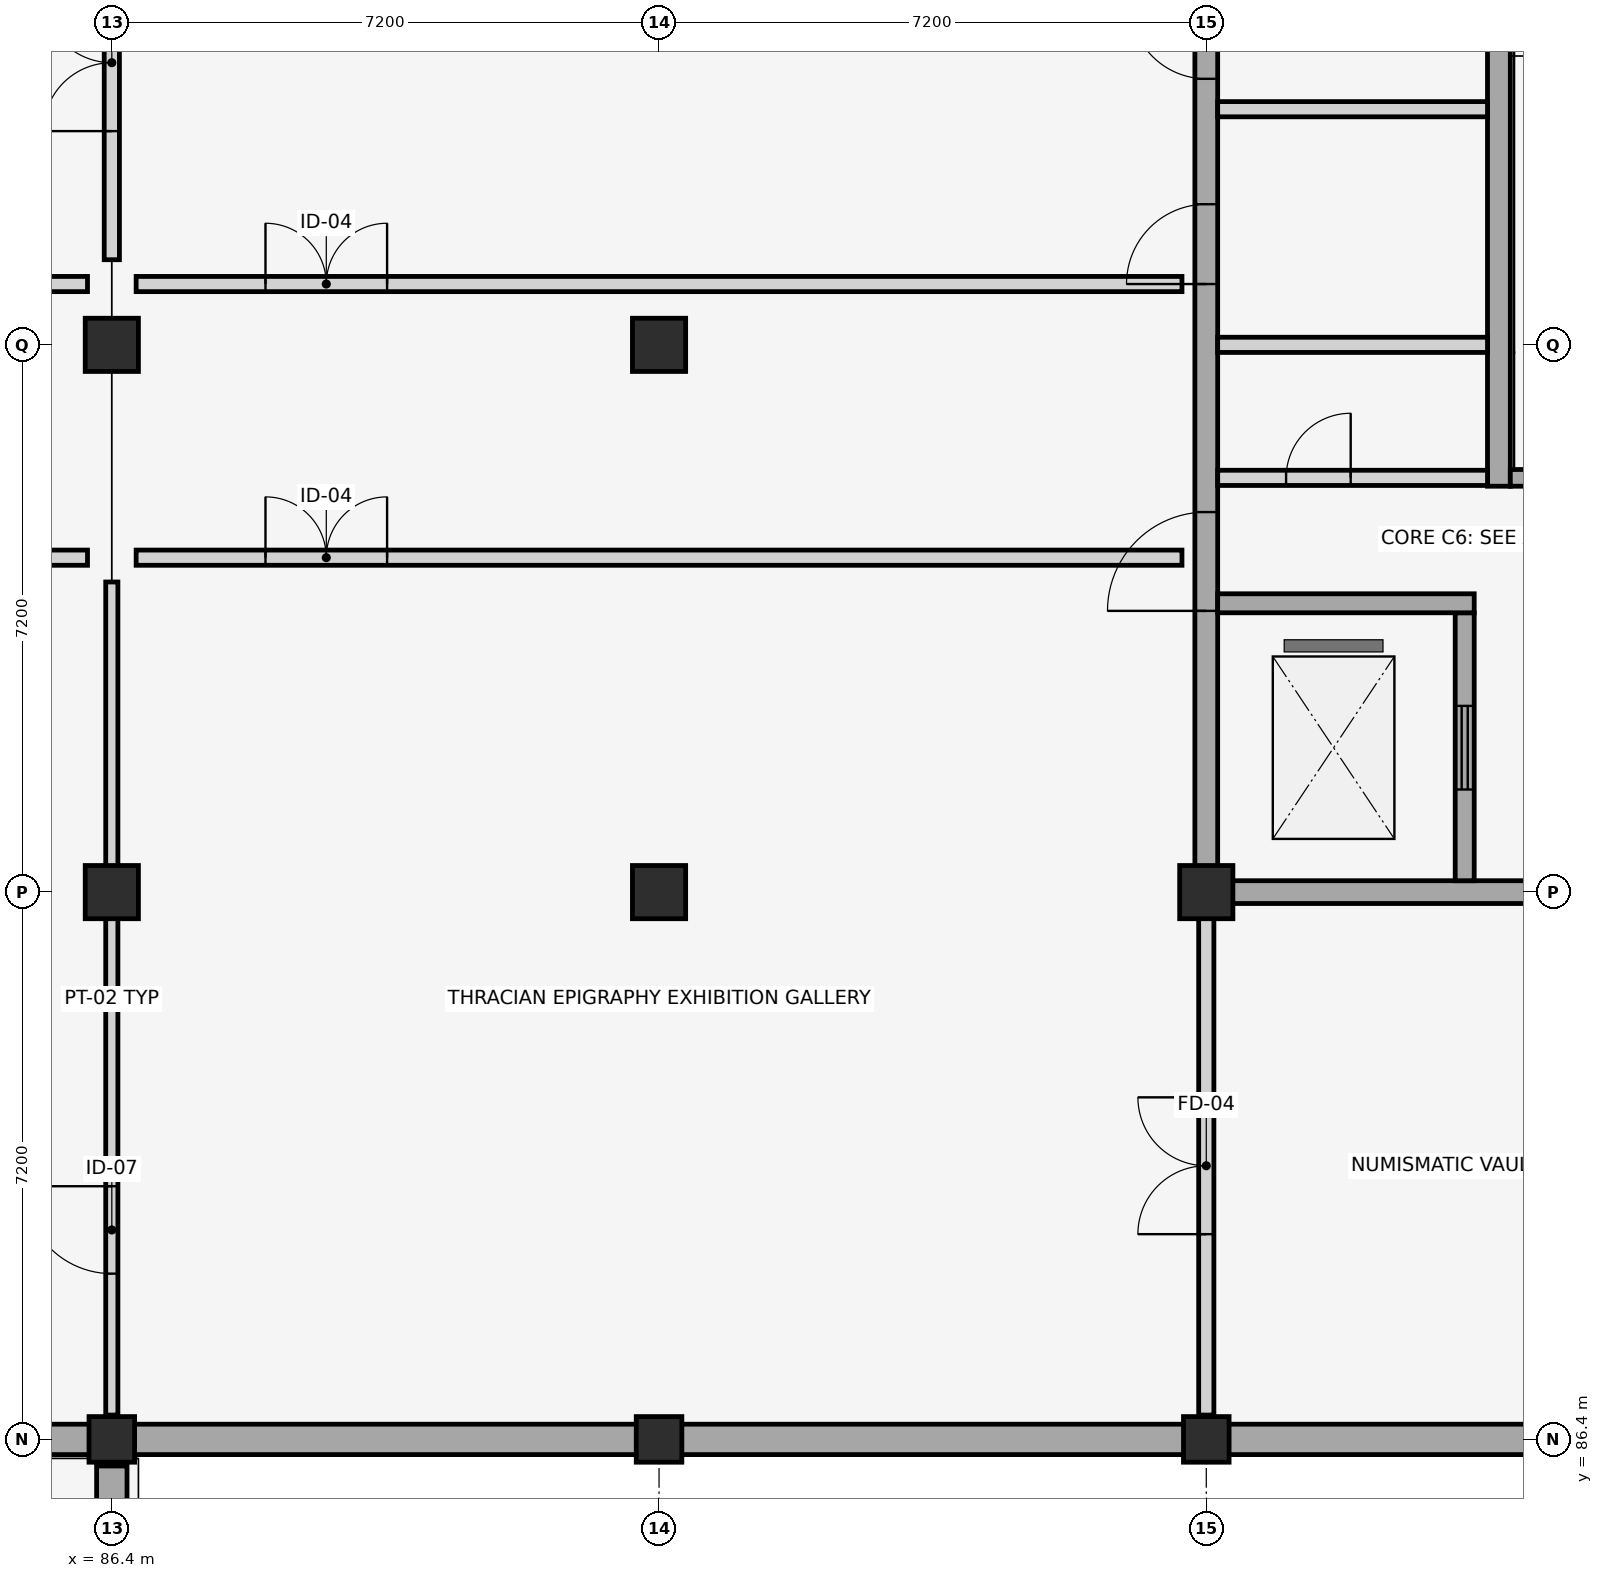
"""IFC4 building model, lengths in metres.
Left out: names, types, materials, properties, quantities, classifications, styles, units other than length and angle.
Written with IfcOpenShell. Run it as: python <this file> out.ifc"""

import sys

from ifc_helpers import new_model, si_unit, direction, frame, frame_2d, origin, origin_2d, place, context, subcontext, project, spatial, rectangle, extrude, element, fill, save


model = new_model("IFC4")
c1 = context("Model", 3, precision=1e-05, world=origin(), true_north=direction((0.0, 1.0)))
c2 = subcontext(c1, "Body", "Model", "MODEL_VIEW")
j1 = project(units=[si_unit("LENGTHUNIT", "METRE"), si_unit("PLANEANGLEUNIT", "RADIAN")], contexts=[c1])
p1 = place(None, origin())
s1 = spatial("IfcSite", under=j1, at=p1, CompositionType="ELEMENT")
p2 = place(p1, origin())
s2 = spatial("IfcBuilding", under=s1, at=p2, CompositionType="ELEMENT")
p3 = place(p2, frame((0.0, 0.0, -4.5)))
s3 = spatial("IfcBuildingStorey", under=s2, at=p3, CompositionType="ELEMENT", Elevation=-4.5)
p4 = place(p3, frame((57.4, 86.4, 0.0), z_axis=(0.0, 0.0, 1.0), x_axis=(1.0, 0.0, 0.0)))
e1 = element("IfcWall", 1, at=p4, inside=s3, PredefinedType="USERDEFINED", context=c2, shape_type="SweptSolid", body=[
    extrude(rectangle(XDim=50.8, YDim=0.4, at=frame_2d((25.4, 0.0))), origin(), (0.0, 0.0, 1.0), 3.67),
])
p5 = place(p4, frame((24.3, 0.0, 0.0)))
e2 = element("IfcOpeningElement", 2, at=p5, cuts=e1, PredefinedType="OPENING", context=c2, shape_type="SweptSolid", body=[
    extrude(rectangle(XDim=1.8, YDim=2.4, at=frame_2d((0.9, 1.2))), frame((0.0, 0.21, 0.0), z_axis=(0.0, -1.0, 0.0), x_axis=(1.0, 0.0, 0.0)), (0.0, 0.0, 1.0), 0.42),
])
p6 = place(p3, frame((86.4, 86.4, -0.45), z_axis=(0.0, 0.0, 1.0), x_axis=(1.0, 0.0, 0.0)))
e3 = element("IfcColumn", 3, at=p6, inside=s3, PredefinedType="COLUMN", context=c2, shape_type="SweptSolid", body=[
    extrude(rectangle(XDim=0.6, YDim=0.6, at=origin_2d()), origin(), (0.0, 0.0, 1.0), 4.95),
])
for number, where, z_axis, x_axis in (
    (4, (86.4, 93.6, -0.45), (0.0, 0.0, 1.0), (0.0, 1.0, 0.0)),
    (5, (86.4, 100.8, -0.45), (0.0, 0.0, 1.0), (1.0, 0.0, 0.0)),
):
    element("IfcColumn", number, at=place(p3, frame(where, z_axis=z_axis, x_axis=x_axis)), inside=s3, PredefinedType="COLUMN", context=c2, shape_type="SweptSolid", body=[
        extrude(rectangle(XDim=0.7, YDim=0.7, at=origin_2d()), origin(), (0.0, 0.0, 1.0), 4.95),
    ])
p7 = place(p3, frame((93.6, 86.4, -0.45), z_axis=(0.0, 0.0, 1.0), x_axis=(0.0, 1.0, 0.0)))
e6 = element("IfcColumn", 6, at=p7, inside=s3, PredefinedType="COLUMN", context=c2, shape_type="SweptSolid", body=[
    extrude(rectangle(XDim=0.6, YDim=0.6, at=origin_2d()), origin(), (0.0, 0.0, 1.0), 4.95),
])
for number, where, z_axis, x_axis in (
    (7, (93.6, 93.6, -0.45), (0.0, 0.0, 1.0), (1.0, 0.0, 0.0)),
    (8, (93.6, 100.8, -0.45), (0.0, 0.0, 1.0), (0.0, 1.0, 0.0)),
):
    element("IfcColumn", number, at=place(p3, frame(where, z_axis=z_axis, x_axis=x_axis)), inside=s3, PredefinedType="COLUMN", context=c2, shape_type="SweptSolid", body=[
        extrude(rectangle(XDim=0.7, YDim=0.7, at=origin_2d()), origin(), (0.0, 0.0, 1.0), 4.95),
    ])
p8 = place(p3, frame((100.8, 86.4, -0.45), z_axis=(0.0, 0.0, 1.0), x_axis=(1.0, 0.0, 0.0)))
e9 = element("IfcColumn", 9, at=p8, inside=s3, PredefinedType="COLUMN", context=c2, shape_type="SweptSolid", body=[
    extrude(rectangle(XDim=0.6, YDim=0.6, at=origin_2d()), origin(), (0.0, 0.0, 1.0), 4.95),
])
p9 = place(p3, frame((100.8, 93.6, -0.45), z_axis=(0.0, 0.0, 1.0), x_axis=(0.0, 1.0, 0.0)))
e10 = element("IfcColumn", 10, at=p9, inside=s3, PredefinedType="COLUMN", context=c2, shape_type="SweptSolid", body=[
    extrude(rectangle(XDim=0.7, YDim=0.7, at=origin_2d()), origin(), (0.0, 0.0, 1.0), 4.95),
])
p10 = place(p3, frame((86.4, 29.15, 0.0), z_axis=(0.0, 0.0, 1.0), x_axis=(0.0, 1.0, 0.0)))
e11 = element("IfcWall", 11, at=p10, inside=s3, PredefinedType="USERDEFINED", context=c2, shape_type="SweptSolid", body=[
    extrude(rectangle(XDim=56.9, YDim=0.4, at=frame_2d((28.45, 0.0))), origin(), (0.0, 0.0, 1.0), 3.67),
])
p11 = place(p3, frame((100.65, 93.6, 0.0), z_axis=(0.0, 0.0, 1.0), x_axis=(1.0, 0.0, 0.0)))
e12 = element("IfcWall", 12, at=p11, inside=s3, PredefinedType="SHEAR", context=c2, shape_type="SweptSolid", body=[
    extrude(rectangle(XDim=7.15, YDim=0.3, at=frame_2d((3.575, 0.0))), origin(), (0.0, 0.0, 1.0), 4.25),
])
p12 = place(p3, frame((100.8, 93.75, 0.0), z_axis=(0.0, 0.0, 1.0), x_axis=(0.0, 1.0, 0.0)))
e13 = element("IfcWall", 13, at=p12, inside=s3, PredefinedType="SHEAR", context=c2, shape_type="SweptSolid", body=[
    extrude(rectangle(XDim=14.1, YDim=0.3, at=frame_2d((7.05, 0.0))), origin(), (0.0, 0.0, 1.0), 4.25),
])
p13 = place(p12, frame((3.55, 0.0, 0.0)))
e14 = element("IfcOpeningElement", 14, at=p13, cuts=e13, PredefinedType="OPENING", context=c2, shape_type="SweptSolid", body=[
    extrude(rectangle(XDim=1.3, YDim=2.2, at=frame_2d((0.65, 1.1))), frame((0.0, 0.16, 0.0), z_axis=(0.0, -1.0, 0.0), x_axis=(1.0, 0.0, 0.0)), (0.0, 0.0, 1.0), 0.32),
])
p14 = place(p12, frame((7.85, 0.0, 0.0)))
e15 = element("IfcOpeningElement", 15, at=p14, cuts=e13, PredefinedType="OPENING", context=c2, shape_type="SweptSolid", body=[
    extrude(rectangle(XDim=1.05, YDim=2.15, at=frame_2d((0.525, 1.075))), frame((0.0, 0.16, 0.0), z_axis=(0.0, -1.0, 0.0), x_axis=(1.0, 0.0, 0.0)), (0.0, 0.0, 1.0), 0.32),
])
p15 = place(p12, frame((10.55, 0.0, 0.0)))
e16 = element("IfcOpeningElement", 16, at=p15, cuts=e13, PredefinedType="OPENING", context=c2, shape_type="SweptSolid", body=[
    extrude(rectangle(XDim=1.0, YDim=2.15, at=frame_2d((0.5, 1.075))), frame((0.0, 0.16, 0.0), z_axis=(0.0, -1.0, 0.0), x_axis=(1.0, 0.0, 0.0)), (0.0, 0.0, 1.0), 0.32),
])
p16 = place(p3, frame((104.2, 93.75, 0.0), z_axis=(0.0, 0.0, 1.0), x_axis=(0.0, 1.0, 0.0)))
e17 = element("IfcWall", 17, at=p16, inside=s3, PredefinedType="SHEAR", context=c2, shape_type="SweptSolid", body=[
    extrude(rectangle(XDim=3.525, YDim=0.25, at=frame_2d((1.762, 0.0))), origin(), (0.0, 0.0, 1.0), 4.25),
])
p17 = place(p16, frame((1.2, 0.0, 0.0)))
e18 = element("IfcOpeningElement", 18, at=p17, cuts=e17, PredefinedType="OPENING", context=c2, shape_type="SweptSolid", body=[
    extrude(rectangle(XDim=1.1, YDim=2.15, at=frame_2d((0.55, 1.075))), frame((0.0, 0.135, 0.0), z_axis=(0.0, -1.0, 0.0), x_axis=(1.0, 0.0, 0.0)), (0.0, 0.0, 1.0), 0.27),
])
p18 = place(p3, frame((104.65, 98.94, 0.0), z_axis=(0.0, 0.0, 1.0), x_axis=(0.0, 1.0, 0.0)))
e19 = element("IfcWall", 19, at=p18, inside=s3, PredefinedType="SHEAR", context=c2, shape_type="SweptSolid", body=[
    extrude(rectangle(XDim=8.91, YDim=0.3, at=frame_2d((4.455, 0.0))), origin(), (0.0, 0.0, 1.0), 4.25),
])
p19 = place(p3, frame((100.95, 99.05, 0.0), z_axis=(0.0, 0.0, 1.0), x_axis=(1.0, 0.0, 0.0)))
e20 = element("IfcWall", 20, at=p19, inside=s3, PredefinedType="PLUMBINGWALL", context=c2, shape_type="SweptSolid", body=[
    extrude(rectangle(XDim=3.55, YDim=0.2, at=frame_2d((1.775, 0.0))), origin(), (0.0, 0.0, 1.0), 3.67),
])
p20 = place(p19, frame((0.9, 0.0, 0.0)))
e21 = element("IfcOpeningElement", 21, at=p20, cuts=e20, PredefinedType="OPENING", context=c2, shape_type="SweptSolid", body=[
    extrude(rectangle(XDim=0.85, YDim=2.05, at=frame_2d((0.425, 1.025))), frame((0.0, 0.11, 0.0), z_axis=(0.0, -1.0, 0.0), x_axis=(1.0, 0.0, 0.0)), (0.0, 0.0, 1.0), 0.22),
])
p21 = place(p3, frame((104.8, 99.05, 0.0), z_axis=(0.0, 0.0, 1.0), x_axis=(1.0, 0.0, 0.0)))
e22 = element("IfcWall", 22, at=p21, inside=s3, PredefinedType="SHEAR", context=c2, shape_type="SweptSolid", body=[
    extrude(rectangle(XDim=3.0, YDim=0.22, at=frame_2d((1.5, 0.0))), origin(), (0.0, 0.0, 1.0), 4.25),
])
p22 = place(p21, frame((0.75, 0.0, 0.0)))
e23 = element("IfcOpeningElement", 23, at=p22, cuts=e22, PredefinedType="OPENING", context=c2, shape_type="SweptSolid", body=[
    extrude(rectangle(XDim=1.3, YDim=2.2, at=frame_2d((0.65, 1.1))), frame((0.0, 0.12, 0.0), z_axis=(0.0, -1.0, 0.0), x_axis=(1.0, 0.0, 0.0)), (0.0, 0.0, 1.0), 0.24),
])
p23 = place(p3, frame((100.95, 97.4, 0.0), z_axis=(0.0, 0.0, 1.0), x_axis=(1.0, 0.0, 0.0)))
e24 = element("IfcWall", 24, at=p23, inside=s3, PredefinedType="SHEAR", context=c2, shape_type="SweptSolid", body=[
    extrude(rectangle(XDim=3.375, YDim=0.25, at=frame_2d((1.688, 0.0))), origin(), (0.0, 0.0, 1.0), 4.25),
])
for number, where, z_axis, x_axis in (
    (25, (100.95, 100.8, 0.0), (0.0, 0.0, 1.0), (1.0, 0.0, 0.0)),
    (26, (100.95, 103.9, 0.0), (0.0, 0.0, 1.0), (1.0, 0.0, 0.0)),
):
    element("IfcWall", number, at=place(p3, frame(where, z_axis=z_axis, x_axis=x_axis)), inside=s3, PredefinedType="PLUMBINGWALL", context=c2, shape_type="SweptSolid", body=[
        extrude(rectangle(XDim=3.55, YDim=0.2, at=frame_2d((1.775, 0.0))), origin(), (0.0, 0.0, 1.0), 3.67),
    ])
p24 = place(p3, frame((65.12, 98.0, 0.0), z_axis=(0.0, 0.0, 1.0), x_axis=(1.0, 0.0, 0.0)))
e27 = element("IfcWall", 27, at=p24, inside=s3, PredefinedType="PARTITIONING", context=c2, shape_type="SweptSolid", body=[
    extrude(rectangle(XDim=20.96, YDim=0.2, at=frame_2d((10.48, 0.0))), origin(), (0.0, 0.0, 1.0), 3.45),
])
p25 = place(p24, frame((9.68, 0.0, 0.0)))
e28 = element("IfcOpeningElement", 28, at=p25, cuts=e27, PredefinedType="OPENING", context=c2, shape_type="SweptSolid", body=[
    extrude(rectangle(XDim=1.6, YDim=2.35, at=frame_2d((0.8, 1.175))), frame((0.0, 0.11, 0.0), z_axis=(0.0, -1.0, 0.0), x_axis=(1.0, 0.0, 0.0)), (0.0, 0.0, 1.0), 0.22),
])
p26 = place(p3, frame((86.72, 98.0, 0.0), z_axis=(0.0, 0.0, 1.0), x_axis=(1.0, 0.0, 0.0)))
e29 = element("IfcWall", 29, at=p26, inside=s3, PredefinedType="PARTITIONING", context=c2, shape_type="SweptSolid", body=[
    extrude(rectangle(XDim=13.76, YDim=0.2, at=frame_2d((6.88, 0.0))), origin(), (0.0, 0.0, 1.0), 3.45),
])
p27 = place(p26, frame((1.702, 0.0, 0.0)))
e30 = element("IfcOpeningElement", 30, at=p27, cuts=e29, PredefinedType="OPENING", context=c2, shape_type="SweptSolid", body=[
    extrude(rectangle(XDim=1.6, YDim=2.35, at=frame_2d((0.8, 1.175))), frame((0.0, 0.11, 0.0), z_axis=(0.0, -1.0, 0.0), x_axis=(1.0, 0.0, 0.0)), (0.0, 0.0, 1.0), 0.22),
])
p28 = place(p3, frame((65.12, 101.6, 0.0), z_axis=(0.0, 0.0, 1.0), x_axis=(1.0, 0.0, 0.0)))
e31 = element("IfcWall", 31, at=p28, inside=s3, PredefinedType="PARTITIONING", context=c2, shape_type="SweptSolid", body=[
    extrude(rectangle(XDim=20.96, YDim=0.2, at=frame_2d((10.48, 0.0))), origin(), (0.0, 0.0, 1.0), 3.45),
])
p29 = place(p28, frame((9.58, 0.0, 0.0)))
e32 = element("IfcOpeningElement", 32, at=p29, cuts=e31, PredefinedType="OPENING", context=c2, shape_type="SweptSolid", body=[
    extrude(rectangle(XDim=1.8, YDim=2.4, at=frame_2d((0.9, 1.2))), frame((0.0, 0.11, 0.0), z_axis=(0.0, -1.0, 0.0), x_axis=(1.0, 0.0, 0.0)), (0.0, 0.0, 1.0), 0.22),
])
p30 = place(p3, frame((86.72, 101.6, 0.0), z_axis=(0.0, 0.0, 1.0), x_axis=(1.0, 0.0, 0.0)))
e33 = element("IfcWall", 33, at=p30, inside=s3, PredefinedType="PARTITIONING", context=c2, shape_type="SweptSolid", body=[
    extrude(rectangle(XDim=13.76, YDim=0.2, at=frame_2d((6.88, 0.0))), origin(), (0.0, 0.0, 1.0), 3.45),
])
p31 = place(p30, frame((1.702, 0.0, 0.0)))
e34 = element("IfcOpeningElement", 34, at=p31, cuts=e33, PredefinedType="OPENING", context=c2, shape_type="SweptSolid", body=[
    extrude(rectangle(XDim=1.6, YDim=2.35, at=frame_2d((0.8, 1.175))), frame((0.0, 0.11, 0.0), z_axis=(0.0, -1.0, 0.0), x_axis=(1.0, 0.0, 0.0)), (0.0, 0.0, 1.0), 0.22),
])
p32 = place(p3, frame((86.4, 86.72, 0.0), z_axis=(0.0, 0.0, 1.0), x_axis=(0.0, 1.0, 0.0)))
e35 = element("IfcWall", 35, at=p32, inside=s3, PredefinedType="PARTITIONING", context=c2, shape_type="SweptSolid", body=[
    extrude(rectangle(XDim=10.96, YDim=0.16, at=frame_2d((5.48, 0.0))), origin(), (0.0, 0.0, 1.0), 3.45),
])
p33 = place(p32, frame((1.861, 0.0, 0.0)))
e36 = element("IfcOpeningElement", 36, at=p33, cuts=e35, PredefinedType="OPENING", context=c2, shape_type="SweptSolid", body=[
    extrude(rectangle(XDim=1.15, YDim=2.2, at=frame_2d((0.575, 1.1))), frame((0.0, 0.09, 0.0), z_axis=(0.0, -1.0, 0.0), x_axis=(1.0, 0.0, 0.0)), (0.0, 0.0, 1.0), 0.18),
])
p34 = place(p3, frame((100.8, 86.72, 0.0), z_axis=(0.0, 0.0, 1.0), x_axis=(0.0, 1.0, 0.0)))
e37 = element("IfcWall", 37, at=p34, inside=s3, PredefinedType="PARTITIONING", context=c2, shape_type="SweptSolid", body=[
    extrude(rectangle(XDim=6.56, YDim=0.2, at=frame_2d((3.28, 0.0))), origin(), (0.0, 0.0, 1.0), 3.45),
])
p35 = place(p34, frame((2.38, 0.0, 0.0)))
e38 = element("IfcOpeningElement", 38, at=p35, cuts=e37, PredefinedType="OPENING", context=c2, shape_type="SweptSolid", body=[
    extrude(rectangle(XDim=1.8, YDim=2.4, at=frame_2d((0.9, 1.2))), frame((0.0, 0.11, 0.0), z_axis=(0.0, -1.0, 0.0), x_axis=(1.0, 0.0, 0.0)), (0.0, 0.0, 1.0), 0.22),
])
p36 = place(p3, frame((86.4, 101.92, 0.0), z_axis=(0.0, 0.0, 1.0), x_axis=(0.0, 1.0, 0.0)))
e39 = element("IfcWall", 39, at=p36, inside=s3, PredefinedType="PARTITIONING", context=c2, shape_type="SweptSolid", body=[
    extrude(rectangle(XDim=12.96, YDim=0.2, at=frame_2d((6.48, 0.0))), origin(), (0.0, 0.0, 1.0), 3.45),
])
p37 = place(p36, frame((1.692, 0.0, 0.0)))
e40 = element("IfcOpeningElement", 40, at=p37, cuts=e39, PredefinedType="OPENING", context=c2, shape_type="SweptSolid", body=[
    extrude(rectangle(XDim=1.8, YDim=2.4, at=frame_2d((0.9, 1.2))), frame((0.0, 0.11, 0.0), z_axis=(0.0, -1.0, 0.0), x_axis=(1.0, 0.0, 0.0)), (0.0, 0.0, 1.0), 0.22),
])
p38 = place(p13, origin())
e41 = element("IfcDoor", 41, at=p38, inside=s3, OperationType="SINGLE_SWING_LEFT", PredefinedType="DOOR", context=c2, shape_type="SweptSolid", body=[
    extrude(rectangle(XDim=1.3, YDim=2.2, at=frame_2d((0.65, 1.1))), frame((0.0, 0.025, 0.0), z_axis=(0.0, -1.0, 0.0), x_axis=(1.0, 0.0, 0.0)), (0.0, 0.0, 1.0), 0.05),
])
fill(e14, e41)
p39 = place(p14, origin())
e42 = element("IfcDoor", 42, at=p39, inside=s3, OperationType="SINGLE_SWING_LEFT", PredefinedType="DOOR", context=c2, shape_type="SweptSolid", body=[
    extrude(rectangle(XDim=1.05, YDim=2.15, at=frame_2d((0.525, 1.075))), frame((0.0, 0.025, 0.0), z_axis=(0.0, -1.0, 0.0), x_axis=(1.0, 0.0, 0.0)), (0.0, 0.0, 1.0), 0.05),
])
fill(e15, e42)
p40 = place(p15, origin())
e43 = element("IfcDoor", 43, at=p40, inside=s3, OperationType="SINGLE_SWING_RIGHT", PredefinedType="DOOR", context=c2, shape_type="SweptSolid", body=[
    extrude(rectangle(XDim=1.0, YDim=2.15, at=frame_2d((0.5, 1.075))), frame((0.0, 0.025, 0.0), z_axis=(0.0, -1.0, 0.0), x_axis=(1.0, 0.0, 0.0)), (0.0, 0.0, 1.0), 0.05),
])
fill(e16, e43)
p41 = place(p17, origin())
e44 = element("IfcDoor", 44, at=p41, inside=s3, OperationType="SLIDING_TO_LEFT", PredefinedType="DOOR", context=c2, shape_type="SweptSolid", body=[
    extrude(rectangle(XDim=1.1, YDim=2.15, at=frame_2d((0.55, 1.075))), frame((0.0, 0.025, 0.0), z_axis=(0.0, -1.0, 0.0), x_axis=(1.0, 0.0, 0.0)), (0.0, 0.0, 1.0), 0.05),
])
fill(e18, e44)
p42 = place(p20, origin())
e45 = element("IfcDoor", 45, at=p42, inside=s3, OperationType="SINGLE_SWING_RIGHT", PredefinedType="TRAPDOOR", context=c2, shape_type="SweptSolid", body=[
    extrude(rectangle(XDim=0.85, YDim=2.05, at=frame_2d((0.425, 1.025))), frame((0.0, 0.025, 0.0), z_axis=(0.0, -1.0, 0.0), x_axis=(1.0, 0.0, 0.0)), (0.0, 0.0, 1.0), 0.05),
])
fill(e21, e45)
p43 = place(p27, origin())
e46 = element("IfcDoor", 46, at=p43, inside=s3, OperationType="DOUBLE_DOOR_SINGLE_SWING", PredefinedType="DOOR", context=c2, shape_type="SweptSolid", body=[
    extrude(rectangle(XDim=1.6, YDim=2.35, at=frame_2d((0.8, 1.175))), frame((0.0, 0.025, 0.0), z_axis=(0.0, -1.0, 0.0), x_axis=(1.0, 0.0, 0.0)), (0.0, 0.0, 1.0), 0.05),
])
fill(e30, e46)
p44 = place(p31, origin())
e47 = element("IfcDoor", 47, at=p44, inside=s3, OperationType="DOUBLE_DOOR_SINGLE_SWING", PredefinedType="DOOR", context=c2, shape_type="SweptSolid", body=[
    extrude(rectangle(XDim=1.6, YDim=2.35, at=frame_2d((0.8, 1.175))), frame((0.0, 0.025, 0.0), z_axis=(0.0, -1.0, 0.0), x_axis=(1.0, 0.0, 0.0)), (0.0, 0.0, 1.0), 0.05),
])
fill(e34, e47)
p45 = place(p33, origin())
e48 = element("IfcDoor", 48, at=p45, inside=s3, OperationType="SINGLE_SWING_RIGHT", PredefinedType="DOOR", context=c2, shape_type="SweptSolid", body=[
    extrude(rectangle(XDim=1.15, YDim=2.2, at=frame_2d((0.575, 1.1))), frame((0.0, 0.025, 0.0), z_axis=(0.0, -1.0, 0.0), x_axis=(1.0, 0.0, 0.0)), (0.0, 0.0, 1.0), 0.05),
])
fill(e36, e48)
p46 = place(p35, origin())
e49 = element("IfcDoor", 49, at=p46, inside=s3, OperationType="DOUBLE_DOOR_SINGLE_SWING", PredefinedType="DOOR", context=c2, shape_type="SweptSolid", body=[
    extrude(rectangle(XDim=1.8, YDim=2.4, at=frame_2d((0.9, 1.2))), frame((0.0, 0.025, 0.0), z_axis=(0.0, -1.0, 0.0), x_axis=(1.0, 0.0, 0.0)), (0.0, 0.0, 1.0), 0.05),
])
fill(e38, e49)
p47 = place(p37, origin())
e50 = element("IfcDoor", 50, at=p47, inside=s3, OperationType="DOUBLE_DOOR_SINGLE_SWING", PredefinedType="DOOR", context=c2, shape_type="SweptSolid", body=[
    extrude(rectangle(XDim=1.8, YDim=2.4, at=frame_2d((0.9, 1.2))), frame((0.0, 0.025, 0.0), z_axis=(0.0, -1.0, 0.0), x_axis=(1.0, 0.0, 0.0)), (0.0, 0.0, 1.0), 0.05),
])
fill(e40, e50)
save(model, sys.argv[1])
